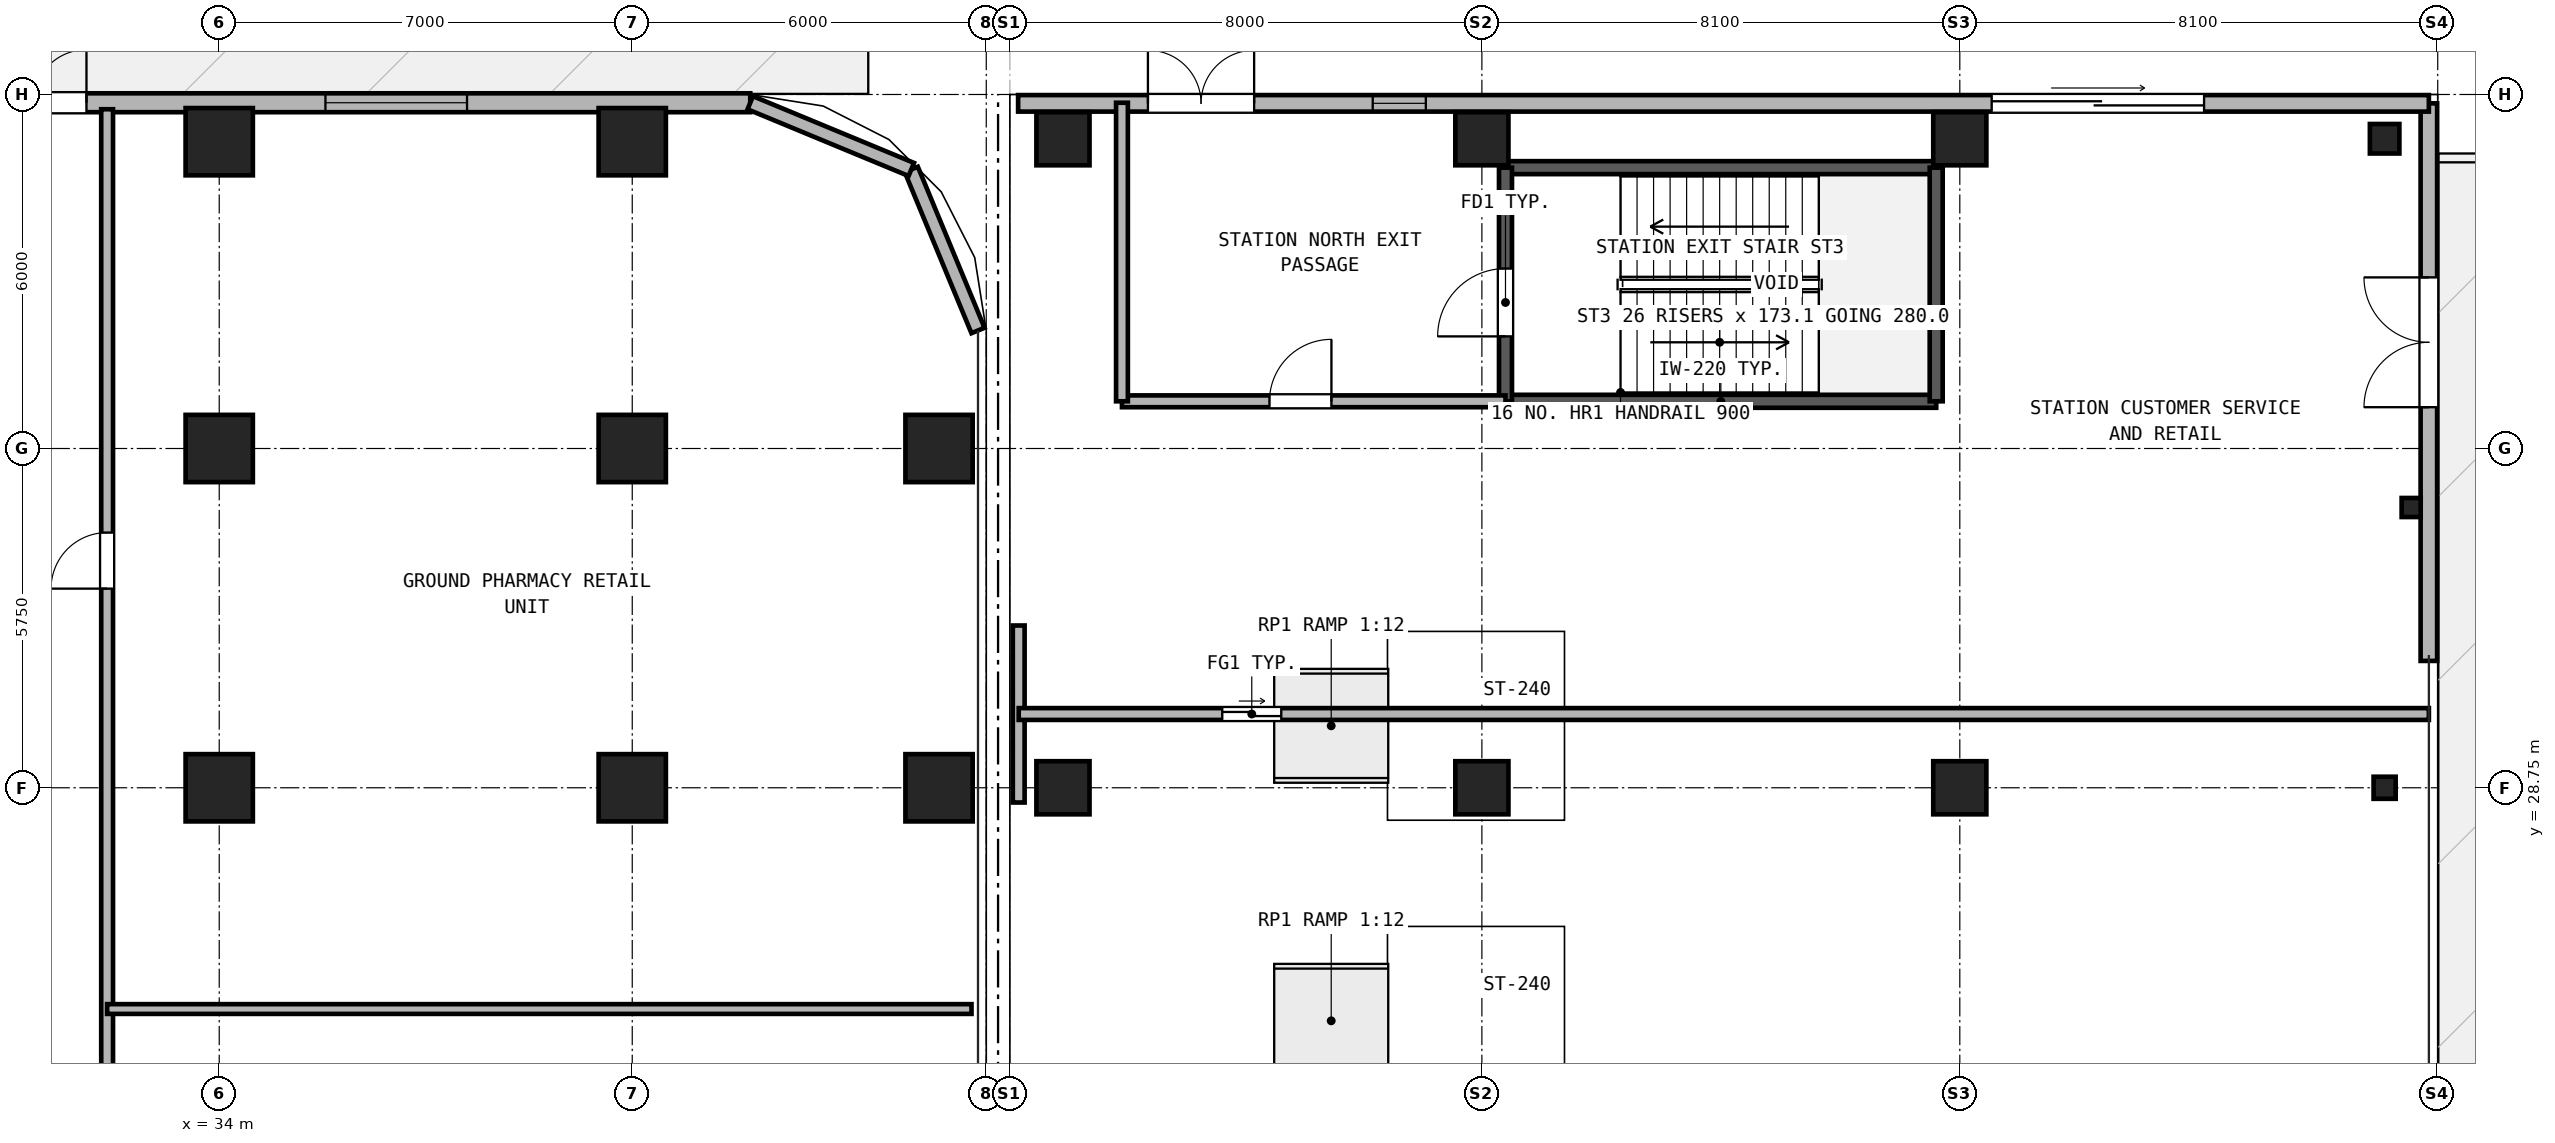
"""IFC4 building model, lengths in metres.
Left out: names, types, materials, properties, quantities, classifications, styles, units other than length and angle.
Written with IfcOpenShell. Run it as: python <this file> out.ifc"""

import sys

from ifc_helpers import new_model, si_unit, direction, frame, frame_2d, origin, origin_2d, place, context, subcontext, project, spatial, rectangle, hollow_rectangle, i_section, extrude, source, transform, mapped, element, fill, save


model = new_model("IFC4")
c1 = context("Model", 3, precision=1e-05, world=origin(), true_north=direction((0.0, 1.0)))
c2 = subcontext(c1, "Body", "Model", "MODEL_VIEW")
j1 = project(units=[si_unit("LENGTHUNIT", "METRE"), si_unit("PLANEANGLEUNIT", "RADIAN")], contexts=[c1])
p1 = place(None, origin())
s1 = spatial("IfcSite", under=j1, at=p1, CompositionType="ELEMENT")
p2 = place(p1, origin())
s2 = spatial("IfcBuilding", under=s1, at=p2, CompositionType="ELEMENT")
p3 = place(p2, origin())
s3 = spatial("IfcBuildingStorey", under=s2, at=p3, CompositionType="ELEMENT", Elevation=0.0)
m1 = source(origin(), c2, "Body", "SweptSolid", [
    extrude(hollow_rectangle(XDim=1.14, YDim=1.14, WallThickness=0.07, at=origin_2d()), origin(), (0.0, 0.0, 1.0), 4.18),
])
for number, where, z_axis, x_axis in (
    (1, (34.0, 39.7, 0.0), (0.0, 0.0, 1.0), (1.0, 0.0, 0.0)),
    (2, (41.0, 39.7, 0.0), (0.0, 0.0, 1.0), (1.0, 0.0, 0.0)),
    (3, (46.2, 28.75, 0.0), (0.0, 0.0, 1.0), (1.0, 0.0, 0.0)),
    (4, (46.2, 34.5, 0.0), (0.0, 0.0, 1.0), (1.0, 0.0, 0.0)),
    (5, (34.0, 28.75, 0.0), (0.0, 0.0, 1.0), (1.0, 0.0, 0.0)),
    (6, (34.0, 34.5, 0.0), (0.0, 0.0, 1.0), (1.0, 0.0, 0.0)),
    (7, (41.0, 28.75, 0.0), (0.0, 0.0, 1.0), (1.0, 0.0, 0.0)),
    (8, (41.0, 34.5, 0.0), (0.0, 0.0, 1.0), (1.0, 0.0, 0.0)),
):
    element("IfcColumn", number, at=place(p3, frame(where, z_axis=z_axis, x_axis=x_axis)), inside=s3, PredefinedType="COLUMN", context=c2, shape_type="MappedRepresentation", body=[
        mapped(m1, transform((0.0, 0.0, 0.0), x_axis=(1.0, 0.0, 0.0), y_axis=(0.0, 1.0, 0.0), z_axis=(0.0, 0.0, 1.0), scale=1.0)),
    ])
m2 = source(origin(), c2, "Body", "SweptSolid", [
    extrude(hollow_rectangle(XDim=0.7, YDim=0.9, WallThickness=0.04, at=origin_2d()), origin(), (0.0, 0.0, 1.0), 4.18),
])
for number, where, z_axis, x_axis in (
    (9, (48.3, 28.75, 0.0), (0.0, 0.0, 1.0), (1.0, 0.0, 0.0)),
    (10, (48.3, 39.75, 0.0), (0.0, 0.0, 1.0), (1.0, 0.0, 0.0)),
    (11, (55.4, 28.75, 0.0), (0.0, 0.0, 1.0), (1.0, 0.0, 0.0)),
    (12, (55.4, 39.75, 0.0), (0.0, 0.0, 1.0), (1.0, 0.0, 0.0)),
    (13, (63.5, 28.75, 0.0), (0.0, 0.0, 1.0), (1.0, 0.0, 0.0)),
    (14, (63.5, 39.75, 0.0), (0.0, 0.0, 1.0), (1.0, 0.0, 0.0)),
):
    element("IfcColumn", number, at=place(p3, frame(where, z_axis=z_axis, x_axis=x_axis)), inside=s3, PredefinedType="COLUMN", context=c2, shape_type="MappedRepresentation", body=[
        mapped(m2, transform((0.0, 0.0, 0.0), x_axis=(1.0, 0.0, 0.0), y_axis=(0.0, 1.0, 0.0), z_axis=(0.0, 0.0, 1.0), scale=1.0)),
    ])
m3 = source(origin(), c2, "Body", "SweptSolid", [
    extrude(i_section(OverallWidth=0.374, OverallDepth=0.372, WebThickness=0.016, FlangeThickness=0.026, at=origin_2d()), origin(), (0.0, 0.0, 1.0), 4.18),
])
p4 = place(p3, frame((70.7, 28.75, 0.0), z_axis=(0.0, 0.0, 1.0), x_axis=(1.0, 0.0, 0.0)))
e15 = element("IfcColumn", 15, at=p4, inside=s3, PredefinedType="COLUMN", context=c2, shape_type="MappedRepresentation", body=[
    mapped(m3, transform((0.0, 0.0, 0.0), x_axis=(1.0, 0.0, 0.0), y_axis=(0.0, 1.0, 0.0), z_axis=(0.0, 0.0, 1.0), scale=1.0)),
])
m4 = source(origin(), c2, "Body", "SweptSolid", [
    extrude(hollow_rectangle(XDim=0.5, YDim=0.5, WallThickness=0.025, at=origin_2d()), origin(), (0.0, 0.0, 1.0), 4.18),
])
p5 = place(p3, frame((70.7, 39.75, 0.0), z_axis=(0.0, 0.0, 1.0), x_axis=(1.0, 0.0, 0.0)))
e16 = element("IfcColumn", 16, at=p5, inside=s3, PredefinedType="COLUMN", context=c2, shape_type="MappedRepresentation", body=[
    mapped(m4, transform((0.0, 0.0, 0.0), x_axis=(1.0, 0.0, 0.0), y_axis=(0.0, 1.0, 0.0), z_axis=(0.0, 0.0, 1.0), scale=1.0)),
])
m5 = source(origin(), c2, "Body", "SweptSolid", [
    extrude(i_section(OverallWidth=0.309, OverallDepth=0.323, WebThickness=0.014, FlangeThickness=0.023, at=origin_2d()), origin(), (0.0, 0.0, 1.0), 4.18),
])
p6 = place(p3, frame((71.15, 33.5, 0.0), z_axis=(0.0, 0.0, 1.0), x_axis=(1.0, 0.0, 0.0)))
e17 = element("IfcColumn", 17, at=p6, inside=s3, PredefinedType="PILASTER", context=c2, shape_type="MappedRepresentation", body=[
    mapped(m5, transform((0.0, 0.0, 0.0), x_axis=(1.0, 0.0, 0.0), y_axis=(0.0, 1.0, 0.0), z_axis=(0.0, 0.0, 1.0), scale=1.0)),
])
p7 = place(p3, frame((4.0, 40.36, 0.0), z_axis=(0.0, 0.0, 1.0), x_axis=(1.0, 0.0, 0.0)))
e18 = element("IfcWall", 18, at=p7, inside=s3, PredefinedType="SOLIDWALL", context=c2, shape_type="SweptSolid", body=[
    extrude(rectangle(XDim=39.0, YDim=0.32, at=frame_2d((19.5, 0.0))), origin(), (0.0, 0.0, 1.0), 4.18),
])
p8 = place(p7, frame((12.1, 0.0, 0.0)))
e19 = element("IfcOpeningElement", 19, at=p8, cuts=e18, PredefinedType="OPENING", context=c2, shape_type="SweptSolid", body=[
    extrude(rectangle(XDim=1.8, YDim=2.35, at=frame_2d((0.9, 1.175))), frame((0.0, 0.17, 0.0), z_axis=(0.0, -1.0, 0.0), x_axis=(1.0, 0.0, 0.0)), (0.0, 0.0, 1.0), 0.34),
])
p9 = place(p7, frame((25.95, 0.0, 0.0)))
e20 = element("IfcOpeningElement", 20, at=p9, cuts=e18, PredefinedType="OPENING", context=c2, shape_type="SweptSolid", body=[
    extrude(rectangle(XDim=1.8, YDim=2.35, at=frame_2d((0.9, 1.175))), frame((0.0, 0.17, 0.0), z_axis=(0.0, -1.0, 0.0), x_axis=(1.0, 0.0, 0.0)), (0.0, 0.0, 1.0), 0.34),
])
p10 = place(p7, frame((4.2, 0.0, 0.9)))
e21 = element("IfcOpeningElement", 21, at=p10, cuts=e18, PredefinedType="OPENING", context=c2, shape_type="SweptSolid", body=[
    extrude(rectangle(XDim=2.4, YDim=2.1, at=frame_2d((1.2, 1.05))), frame((0.0, 0.17, 0.0), z_axis=(0.0, -1.0, 0.0), x_axis=(1.0, 0.0, 0.0)), (0.0, 0.0, 1.0), 0.34),
])
p11 = place(p7, frame((19.2, 0.0, 0.9)))
e22 = element("IfcOpeningElement", 22, at=p11, cuts=e18, PredefinedType="OPENING", context=c2, shape_type="SweptSolid", body=[
    extrude(rectangle(XDim=2.4, YDim=2.1, at=frame_2d((1.2, 1.05))), frame((0.0, 0.17, 0.0), z_axis=(0.0, -1.0, 0.0), x_axis=(1.0, 0.0, 0.0)), (0.0, 0.0, 1.0), 0.34),
])
p12 = place(p7, frame((31.8, 0.0, 0.9)))
e23 = element("IfcOpeningElement", 23, at=p12, cuts=e18, PredefinedType="OPENING", context=c2, shape_type="SweptSolid", body=[
    extrude(rectangle(XDim=2.4, YDim=2.1, at=frame_2d((1.2, 1.05))), frame((0.0, 0.17, 0.0), z_axis=(0.0, -1.0, 0.0), x_axis=(1.0, 0.0, 0.0)), (0.0, 0.0, 1.0), 0.34),
])
for number, where, z_axis, x_axis in (
    (24, (46.86, 36.5, 0.0), (0.0, 0.0, 1.0), (-0.383, 0.924, 0.0)),
    (25, (45.729, 39.229, 0.0), (0.0, 0.0, 1.0), (-0.924, 0.383, 0.0)),
):
    element("IfcWall", number, at=place(p3, frame(where, z_axis=z_axis, x_axis=x_axis)), inside=s3, PredefinedType="SOLIDWALL", context=c2, shape_type="SweptSolid", body=[
        extrude(rectangle(XDim=2.954, YDim=0.24, at=frame_2d((1.477, 0.0))), origin(), (0.0, 0.0, 1.0), 4.18),
    ])
p13 = place(p3, frame((71.45, 30.9, 0.0), z_axis=(0.0, 0.0, 1.0), x_axis=(0.0, 1.0, 0.0)))
e26 = element("IfcWall", 26, at=p13, inside=s3, PredefinedType="SOLIDWALL", context=c2, shape_type="SweptSolid", body=[
    extrude(rectangle(XDim=9.45, YDim=0.28, at=frame_2d((4.725, 0.0))), origin(), (0.0, 0.0, 1.0), 4.18),
])
p14 = place(p13, frame((4.3, 0.0, 0.0)))
e27 = element("IfcOpeningElement", 27, at=p14, cuts=e26, PredefinedType="OPENING", context=c2, shape_type="SweptSolid", body=[
    extrude(rectangle(XDim=2.2, YDim=2.5, at=frame_2d((1.1, 1.25))), frame((0.0, 0.15, 0.0), z_axis=(0.0, -1.0, 0.0), x_axis=(1.0, 0.0, 0.0)), (0.0, 0.0, 1.0), 0.3),
])
p15 = place(p3, frame((47.54, 40.35, 0.0), z_axis=(0.0, 0.0, 1.0), x_axis=(1.0, 0.0, 0.0)))
e28 = element("IfcWall", 28, at=p15, inside=s3, PredefinedType="SOLIDWALL", context=c2, shape_type="SweptSolid", body=[
    extrude(rectangle(XDim=23.91, YDim=0.28, at=frame_2d((11.955, 0.0))), origin(), (0.0, 0.0, 1.0), 4.18),
])
p16 = place(p15, frame((6.01, 0.0, 1.1)))
e29 = element("IfcOpeningElement", 29, at=p16, cuts=e28, PredefinedType="OPENING", context=c2, shape_type="SweptSolid", body=[
    extrude(rectangle(XDim=0.9, YDim=1.5, at=frame_2d((0.45, 0.75))), frame((0.0, 0.15, 0.0), z_axis=(0.0, -1.0, 0.0), x_axis=(1.0, 0.0, 0.0)), (0.0, 0.0, 1.0), 0.3),
])
p17 = place(p15, frame((2.2, 0.0, 0.0)))
e30 = element("IfcOpeningElement", 30, at=p17, cuts=e28, PredefinedType="OPENING", context=c2, shape_type="SweptSolid", body=[
    extrude(rectangle(XDim=1.8, YDim=2.35, at=frame_2d((0.9, 1.175))), frame((0.0, 0.15, 0.0), z_axis=(0.0, -1.0, 0.0), x_axis=(1.0, 0.0, 0.0)), (0.0, 0.0, 1.0), 0.3),
])
p18 = place(p15, frame((16.5, 0.0, 0.0)))
e31 = element("IfcOpeningElement", 31, at=p18, cuts=e28, PredefinedType="OPENING", context=c2, shape_type="SweptSolid", body=[
    extrude(rectangle(XDim=3.6, YDim=3.2, at=frame_2d((1.8, 1.6))), frame((0.0, 0.15, 0.0), z_axis=(0.0, -1.0, 0.0), x_axis=(1.0, 0.0, 0.0)), (0.0, 0.0, 1.0), 0.3),
])
p19 = place(p3, frame((32.1, 11.0, 0.0), z_axis=(0.0, 0.0, 1.0), x_axis=(0.0, 1.0, 0.0)))
e32 = element("IfcWall", 32, at=p19, inside=s3, PredefinedType="PARTITIONING", context=c2, shape_type="SweptSolid", body=[
    extrude(rectangle(XDim=29.25, YDim=0.2, at=frame_2d((14.625, 0.0))), origin(), (0.0, 0.0, 1.0), 4.18),
])
p20 = place(p19, frame((6.5, 0.0, 0.0)))
e33 = element("IfcOpeningElement", 33, at=p20, cuts=e32, PredefinedType="OPENING", context=c2, shape_type="SweptSolid", body=[
    extrude(rectangle(XDim=0.95, YDim=2.15, at=frame_2d((0.475, 1.075))), frame((0.0, 0.11, 0.0), z_axis=(0.0, -1.0, 0.0), x_axis=(1.0, 0.0, 0.0)), (0.0, 0.0, 1.0), 0.22),
])
p21 = place(p19, frame((21.125, 0.0, 0.0)))
e34 = element("IfcOpeningElement", 34, at=p21, cuts=e32, PredefinedType="OPENING", context=c2, shape_type="SweptSolid", body=[
    extrude(rectangle(XDim=0.95, YDim=2.15, at=frame_2d((0.475, 1.075))), frame((0.0, 0.11, 0.0), z_axis=(0.0, -1.0, 0.0), x_axis=(1.0, 0.0, 0.0)), (0.0, 0.0, 1.0), 0.22),
])
p22 = place(p3, frame((32.1, 25.0, 0.0), z_axis=(0.0, 0.0, 1.0), x_axis=(1.0, 0.0, 0.0)))
e35 = element("IfcWall", 35, at=p22, inside=s3, PredefinedType="PARTITIONING", context=c2, shape_type="SweptSolid", body=[
    extrude(rectangle(XDim=14.65, YDim=0.165, at=frame_2d((7.325, 0.0))), origin(), (0.0, 0.0, 1.0), 4.18),
])
for number, where, z_axis, x_axis in (
    (36, (55.8, 35.3, 0.0), (0.0, 0.0, 1.0), (1.0, 0.0, 0.0)),
    (37, (55.8, 39.26, 0.0), (0.0, 0.0, 1.0), (1.0, 0.0, 0.0)),
):
    element("IfcWall", number, at=place(p3, frame(where, z_axis=z_axis, x_axis=x_axis)), inside=s3, PredefinedType="SOLIDWALL", context=c2, shape_type="SweptSolid", body=[
        extrude(rectangle(XDim=7.3, YDim=0.22, at=frame_2d((3.65, 0.0))), origin(), (0.0, 0.0, 1.0), 4.18),
    ])
p23 = place(p3, frame((55.8, 35.3, 0.0), z_axis=(0.0, 0.0, 1.0), x_axis=(0.0, 1.0, 0.0)))
e38 = element("IfcWall", 38, at=p23, inside=s3, PredefinedType="SOLIDWALL", context=c2, shape_type="SweptSolid", body=[
    extrude(rectangle(XDim=3.96, YDim=0.22, at=frame_2d((1.98, 0.0))), origin(), (0.0, 0.0, 1.0), 4.18),
])
p24 = place(p23, frame((1.1, 0.0, 0.0)))
e39 = element("IfcOpeningElement", 39, at=p24, cuts=e38, PredefinedType="OPENING", context=c2, shape_type="SweptSolid", body=[
    extrude(rectangle(XDim=1.15, YDim=2.2, at=frame_2d((0.575, 1.1))), frame((0.0, 0.12, 0.0), z_axis=(0.0, -1.0, 0.0), x_axis=(1.0, 0.0, 0.0)), (0.0, 0.0, 1.0), 0.24),
])
p25 = place(p3, frame((63.1, 35.3, 0.0), z_axis=(0.0, 0.0, 1.0), x_axis=(0.0, 1.0, 0.0)))
e40 = element("IfcWall", 40, at=p25, inside=s3, PredefinedType="SOLIDWALL", context=c2, shape_type="SweptSolid", body=[
    extrude(rectangle(XDim=3.96, YDim=0.22, at=frame_2d((1.98, 0.0))), origin(), (0.0, 0.0, 1.0), 4.18),
])
p26 = place(p3, frame((49.3, 35.3, 0.0), z_axis=(0.0, 0.0, 1.0), x_axis=(1.0, 0.0, 0.0)))
e41 = element("IfcWall", 41, at=p26, inside=s3, PredefinedType="PARTITIONING", context=c2, shape_type="SweptSolid", body=[
    extrude(rectangle(XDim=6.5, YDim=0.2, at=frame_2d((3.25, 0.0))), origin(), (0.0, 0.0, 1.0), 4.18),
])
p27 = place(p26, frame((2.5, 0.0, 0.0)))
e42 = element("IfcOpeningElement", 42, at=p27, cuts=e41, PredefinedType="OPENING", context=c2, shape_type="SweptSolid", body=[
    extrude(rectangle(XDim=1.05, YDim=2.15, at=frame_2d((0.525, 1.075))), frame((0.0, 0.11, 0.0), z_axis=(0.0, -1.0, 0.0), x_axis=(1.0, 0.0, 0.0)), (0.0, 0.0, 1.0), 0.22),
])
p28 = place(p3, frame((49.3, 35.3, 0.0), z_axis=(0.0, 0.0, 1.0), x_axis=(0.0, 1.0, 0.0)))
e43 = element("IfcWall", 43, at=p28, inside=s3, PredefinedType="PARTITIONING", context=c2, shape_type="SweptSolid", body=[
    extrude(rectangle(XDim=5.06, YDim=0.2, at=frame_2d((2.53, 0.0))), origin(), (0.0, 0.0, 1.0), 4.18),
])
p29 = place(p3, frame((47.55, 28.5, 0.0), z_axis=(0.0, 0.0, 1.0), x_axis=(0.0, 1.0, 0.0)))
e44 = element("IfcWall", 44, at=p29, inside=s3, PredefinedType="PARTITIONING", context=c2, shape_type="SweptSolid", body=[
    extrude(rectangle(XDim=3.0, YDim=0.2, at=frame_2d((1.5, 0.0))), origin(), (0.0, 0.0, 1.0), 4.18),
])
p30 = place(p3, frame((47.55, 30.0, 0.0), z_axis=(0.0, 0.0, 1.0), x_axis=(1.0, 0.0, 0.0)))
e45 = element("IfcWall", 45, at=p30, inside=s3, PredefinedType="PARTITIONING", context=c2, shape_type="SweptSolid", body=[
    extrude(rectangle(XDim=23.9, YDim=0.2, at=frame_2d((11.95, 0.0))), origin(), (0.0, 0.0, 1.0), 4.18),
])
p31 = place(p30, frame((3.45, 0.0, 0.0)))
e46 = element("IfcOpeningElement", 46, at=p31, cuts=e45, PredefinedType="OPENING", context=c2, shape_type="SweptSolid", body=[
    extrude(rectangle(XDim=1.0, YDim=2.1, at=frame_2d((0.5, 1.05))), frame((0.0, 0.11, 0.0), z_axis=(0.0, -1.0, 0.0), x_axis=(1.0, 0.0, 0.0)), (0.0, 0.0, 1.0), 0.22),
])
p32 = place(p9, origin())
e47 = element("IfcDoor", 47, at=p32, inside=s3, OperationType="DOUBLE_DOOR_SINGLE_SWING", PredefinedType="DOOR", context=c2, shape_type="SweptSolid", body=[
    extrude(rectangle(XDim=1.8, YDim=2.35, at=frame_2d((0.9, 1.175))), frame((0.0, 0.025, 0.0), z_axis=(0.0, -1.0, 0.0), x_axis=(1.0, 0.0, 0.0)), (0.0, 0.0, 1.0), 0.05),
])
fill(e20, e47)
p33 = place(p12, origin())
e48 = element("IfcWindow", 48, at=p33, inside=s3, PartitioningType="SINGLE_PANEL", PredefinedType="WINDOW", context=c2, shape_type="SweptSolid", body=[
    extrude(rectangle(XDim=2.4, YDim=2.1, at=frame_2d((1.2, 1.05))), frame((0.0, 0.03, 0.0), z_axis=(0.0, -1.0, 0.0), x_axis=(1.0, 0.0, 0.0)), (0.0, 0.0, 1.0), 0.06),
])
fill(e23, e48)
p34 = place(p16, origin())
e49 = element("IfcWindow", 49, at=p34, inside=s3, PartitioningType="SINGLE_PANEL", PredefinedType="WINDOW", context=c2, shape_type="SweptSolid", body=[
    extrude(rectangle(XDim=0.9, YDim=1.5, at=frame_2d((0.45, 0.75))), frame((0.0, 0.03, 0.0), z_axis=(0.0, -1.0, 0.0), x_axis=(1.0, 0.0, 0.0)), (0.0, 0.0, 1.0), 0.06),
])
fill(e29, e49)
p35 = place(p14, frame((2.2, 0.0, 0.0), z_axis=(0.0, 0.0, 1.0), x_axis=(-1.0, 0.0, 0.0)))
e50 = element("IfcDoor", 50, at=p35, inside=s3, OperationType="DOUBLE_DOOR_SINGLE_SWING", PredefinedType="DOOR", context=c2, shape_type="SweptSolid", body=[
    extrude(rectangle(XDim=2.2, YDim=2.5, at=frame_2d((1.1, 1.25))), frame((0.0, 0.025, 0.0), z_axis=(0.0, -1.0, 0.0), x_axis=(1.0, 0.0, 0.0)), (0.0, 0.0, 1.0), 0.05),
])
fill(e27, e50)
p36 = place(p17, origin())
e51 = element("IfcDoor", 51, at=p36, inside=s3, OperationType="DOUBLE_DOOR_SINGLE_SWING", PredefinedType="DOOR", context=c2, shape_type="SweptSolid", body=[
    extrude(rectangle(XDim=1.8, YDim=2.35, at=frame_2d((0.9, 1.175))), frame((0.0, 0.025, 0.0), z_axis=(0.0, -1.0, 0.0), x_axis=(1.0, 0.0, 0.0)), (0.0, 0.0, 1.0), 0.05),
])
fill(e30, e51)
p37 = place(p18, origin())
e52 = element("IfcDoor", 52, at=p37, inside=s3, OperationType="ROLLINGUP", PredefinedType="GATE", context=c2, shape_type="SweptSolid", body=[
    extrude(rectangle(XDim=3.6, YDim=3.2, at=frame_2d((1.8, 1.6))), frame((0.0, 0.025, 0.0), z_axis=(0.0, -1.0, 0.0), x_axis=(1.0, 0.0, 0.0)), (0.0, 0.0, 1.0), 0.05),
])
fill(e31, e52)
p38 = place(p21, origin())
e53 = element("IfcDoor", 53, at=p38, inside=s3, OperationType="SINGLE_SWING_LEFT", PredefinedType="DOOR", context=c2, shape_type="SweptSolid", body=[
    extrude(rectangle(XDim=0.95, YDim=2.15, at=frame_2d((0.475, 1.075))), frame((0.0, 0.025, 0.0), z_axis=(0.0, -1.0, 0.0), x_axis=(1.0, 0.0, 0.0)), (0.0, 0.0, 1.0), 0.05),
])
fill(e34, e53)
p39 = place(p24, origin())
e54 = element("IfcDoor", 54, at=p39, inside=s3, OperationType="SINGLE_SWING_LEFT", PredefinedType="DOOR", context=c2, shape_type="SweptSolid", body=[
    extrude(rectangle(XDim=1.15, YDim=2.2, at=frame_2d((0.575, 1.1))), frame((0.0, 0.025, 0.0), z_axis=(0.0, -1.0, 0.0), x_axis=(1.0, 0.0, 0.0)), (0.0, 0.0, 1.0), 0.05),
])
fill(e39, e54)
p40 = place(p27, origin())
e55 = element("IfcDoor", 55, at=p40, inside=s3, OperationType="SINGLE_SWING_RIGHT", PredefinedType="DOOR", context=c2, shape_type="SweptSolid", body=[
    extrude(rectangle(XDim=1.05, YDim=2.15, at=frame_2d((0.525, 1.075))), frame((0.0, 0.025, 0.0), z_axis=(0.0, -1.0, 0.0), x_axis=(1.0, 0.0, 0.0)), (0.0, 0.0, 1.0), 0.05),
])
fill(e42, e55)
p41 = place(p31, origin())
e56 = element("IfcDoor", 56, at=p41, inside=s3, OperationType="DOUBLE_DOOR_SINGLE_SWING", PredefinedType="GATE", context=c2, shape_type="SweptSolid", body=[
    extrude(rectangle(XDim=1.0, YDim=2.1, at=frame_2d((0.5, 1.05))), frame((0.0, 0.025, 0.0), z_axis=(0.0, -1.0, 0.0), x_axis=(1.0, 0.0, 0.0)), (0.0, 0.0, 1.0), 0.05),
])
fill(e46, e56)
save(model, sys.argv[1])
